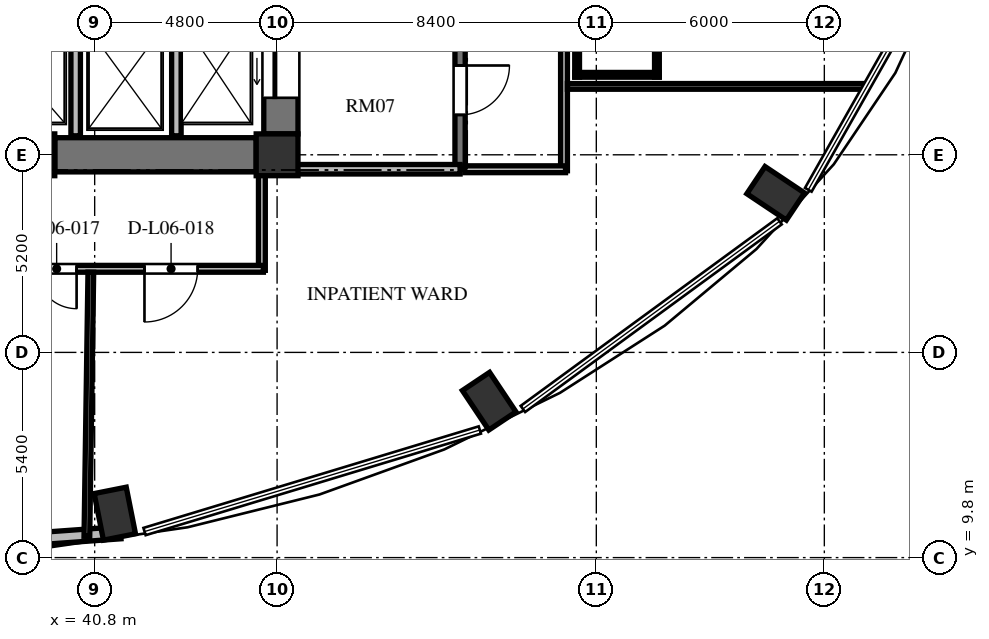
"""IFC4 building model, lengths in metres.
Left out: names, types, materials, properties, quantities, classifications, styles, units other than length and angle.
Written with IfcOpenShell. Run it as: python <this file> out.ifc"""

import sys

from ifc_helpers import new_model, si_unit, direction, frame, frame_2d, origin, origin_2d, place, context, subcontext, project, spatial, rectangle, extrude, element, fill, save


model = new_model("IFC4")
c1 = context("Model", 3, precision=1e-05, world=origin(), true_north=direction((0.0, 1.0)))
c2 = subcontext(c1, "Body", "Model", "MODEL_VIEW")
j1 = project(units=[si_unit("LENGTHUNIT", "METRE"), si_unit("PLANEANGLEUNIT", "RADIAN")], contexts=[c1])
p1 = place(None, origin())
s1 = spatial("IfcSite", under=j1, at=p1, CompositionType="ELEMENT")
p2 = place(p1, origin())
s2 = spatial("IfcBuilding", under=s1, at=p2, CompositionType="ELEMENT")
p3 = place(p2, frame((0.0, 0.0, 28.848)))
s3 = spatial("IfcBuildingStorey", under=s2, at=p3, CompositionType="ELEMENT", Elevation=28.848)
for number, where, z_axis, x_axis in (
    (1, (41.331, 10.956, 0.0), (0.0, 0.0, 1.0), (0.195, -0.981, 0.0)),
    (2, (51.181, 13.916, 0.0), (0.0, 0.0, 1.0), (0.556, -0.831, 0.0)),
    (3, (58.72, 19.386, 0.0), (0.0, 0.0, 1.0), (0.831, -0.556, 0.0)),
):
    element("IfcColumn", number, at=place(p3, frame(where, z_axis=z_axis, x_axis=x_axis)), inside=s3, PredefinedType="COLUMN", context=c2, shape_type="SweptSolid", body=[
        extrude(rectangle(XDim=1.25, YDim=0.86, at=origin_2d()), origin(), (0.0, 0.0, 1.0), 3.648),
    ])
for number, where, z_axis, x_axis in (
    (4, (39.2, 20.4, 0.0), (0.0, 0.0, 1.0), (1.0, 0.0, 0.0)),
    (5, (45.6, 20.4, 0.0), (0.0, 0.0, 1.0), (1.0, 0.0, 0.0)),
):
    element("IfcColumn", number, at=place(p3, frame(where, z_axis=z_axis, x_axis=x_axis)), inside=s3, PredefinedType="COLUMN", context=c2, shape_type="SweptSolid", body=[
        extrude(rectangle(XDim=1.1, YDim=1.1, at=origin_2d()), origin(), (0.0, 0.0, 1.0), 3.648),
    ])
p4 = place(p3, frame((45.7, 20.95, 0.0), z_axis=(0.0, 0.0, 1.0), x_axis=(0.0, 1.0, 0.0)))
e6 = element("IfcWall", 6, at=p4, inside=s3, PredefinedType="SHEAR", context=c2, shape_type="SweptSolid", body=[
    extrude(rectangle(XDim=14.1, YDim=0.9, at=frame_2d((7.05, 0.0))), origin(), (0.0, 0.0, 1.0), 3.648),
])
p5 = place(p4, frame((11.75, 0.0, 0.0)))
e7 = element("IfcOpeningElement", 7, at=p5, cuts=e6, PredefinedType="OPENING", context=c2, shape_type="SweptSolid", body=[
    extrude(rectangle(XDim=1.4, YDim=2.3, at=frame_2d((0.7, 1.15))), frame((0.0, 0.46, 0.0), z_axis=(0.0, -1.0, 0.0), x_axis=(1.0, 0.0, 0.0)), (0.0, 0.0, 1.0), 0.92),
])
p6 = place(p4, frame((0.95, 0.0, 0.0)))
e8 = element("IfcOpeningElement", 8, at=p6, cuts=e6, PredefinedType="OPENING", context=c2, shape_type="SweptSolid", body=[
    extrude(rectangle(XDim=1.4, YDim=2.3, at=frame_2d((0.7, 1.15))), frame((0.0, 0.46, 0.0), z_axis=(0.0, -1.0, 0.0), x_axis=(1.0, 0.0, 0.0)), (0.0, 0.0, 1.0), 0.92),
])
p7 = place(p3, frame((39.75, 20.4, 0.0), z_axis=(0.0, 0.0, 1.0), x_axis=(1.0, 0.0, 0.0)))
e9 = element("IfcWall", 9, at=p7, inside=s3, PredefinedType="SHEAR", context=c2, shape_type="SweptSolid", body=[
    extrude(rectangle(XDim=5.3, YDim=0.9, at=frame_2d((2.65, 0.0))), origin(), (0.0, 0.0, 1.0), 3.648),
])
p8 = place(p3, frame((35.821, 10.047, 0.0), z_axis=(0.0, 0.0, 1.0), x_axis=(0.997422321809, 0.071754525696, 0.0)))
e10 = element("IfcWall", 10, at=p8, inside=s3, PredefinedType="SOLIDWALL", context=c2, shape_type="SweptSolid", body=[
    extrude(rectangle(XDim=5.675, YDim=0.32, at=frame_2d((2.838, 0.0))), origin(), (0.0, 0.0, 1.0), 3.428),
])
p9 = place(p8, frame((2.238, 0.0, 0.85)))
e11 = element("IfcOpeningElement", 11, at=p9, cuts=e10, PredefinedType="OPENING", context=c2, shape_type="SweptSolid", body=[
    extrude(rectangle(XDim=1.2, YDim=1.8, at=frame_2d((0.6, 0.9))), frame((0.0, 0.17, 0.0), z_axis=(0.0, -1.0, 0.0), x_axis=(1.0, 0.0, 0.0)), (0.0, 0.0, 1.0), 0.34),
])
p10 = place(p3, frame((42.95, 20.9, 0.0), z_axis=(0.0, 0.0, 1.0), x_axis=(0.0, 1.0, 0.0)))
e12 = element("IfcWall", 12, at=p10, inside=s3, PredefinedType="SOLIDWALL", context=c2, shape_type="SweptSolid", body=[
    extrude(rectangle(XDim=3.2, YDim=0.25, at=frame_2d((1.6, 0.0))), origin(), (0.0, 0.0, 1.0), 3.428),
])
p11 = place(p3, frame((40.3, 20.9, 0.0), z_axis=(0.0, 0.0, 1.0), x_axis=(0.0, 1.0, 0.0)))
e13 = element("IfcWall", 13, at=p11, inside=s3, PredefinedType="SOLIDWALL", context=c2, shape_type="SweptSolid", body=[
    extrude(rectangle(XDim=2.8, YDim=0.25, at=frame_2d((1.4, 0.0))), origin(), (0.0, 0.0, 1.0), 3.428),
])
p12 = place(p3, frame((50.415, 35.845, 0.0), z_axis=(0.0, 0.0, 1.0), x_axis=(0.0, -1.0, 0.0)))
e14 = element("IfcWall", 14, at=p12, inside=s3, PredefinedType="SHEAR", context=c2, shape_type="SweptSolid", body=[
    extrude(rectangle(XDim=15.825, YDim=0.27, at=frame_2d((7.913, 0.0))), origin(), (0.0, 0.0, 1.0), 3.648),
])
p13 = place(p12, frame((4.445, 0.0, 0.0)))
e15 = element("IfcOpeningElement", 15, at=p13, cuts=e14, PredefinedType="OPENING", context=c2, shape_type="SweptSolid", body=[
    extrude(rectangle(XDim=1.2, YDim=2.15, at=frame_2d((0.6, 1.075))), frame((0.0, 0.145, 0.0), z_axis=(0.0, -1.0, 0.0), x_axis=(1.0, 0.0, 0.0)), (0.0, 0.0, 1.0), 0.29),
])
p14 = place(p12, frame((1.295, 0.0, 0.0)))
e16 = element("IfcOpeningElement", 16, at=p14, cuts=e14, PredefinedType="OPENING", context=c2, shape_type="SweptSolid", body=[
    extrude(rectangle(XDim=1.3, YDim=2.2, at=frame_2d((0.65, 1.1))), frame((0.0, 0.145, 0.0), z_axis=(0.0, -1.0, 0.0), x_axis=(1.0, 0.0, 0.0)), (0.0, 0.0, 1.0), 0.29),
])
p15 = place(p12, frame((13.095, 0.0, 0.0)))
e17 = element("IfcOpeningElement", 17, at=p15, cuts=e14, PredefinedType="OPENING", context=c2, shape_type="SweptSolid", body=[
    extrude(rectangle(XDim=1.3, YDim=2.2, at=frame_2d((0.65, 1.1))), frame((0.0, 0.145, 0.0), z_axis=(0.0, -1.0, 0.0), x_axis=(1.0, 0.0, 0.0)), (0.0, 0.0, 1.0), 0.29),
])
p16 = place(p3, frame((45.7, 20.02, 0.0), z_axis=(0.0, 0.0, 1.0), x_axis=(1.0, 0.0, 0.0)))
e18 = element("IfcWall", 18, at=p16, inside=s3, PredefinedType="SOLIDWALL", context=c2, shape_type="SweptSolid", body=[
    extrude(rectangle(XDim=4.715, YDim=0.25, at=frame_2d((2.357, 0.0))), origin(), (0.0, 0.0, 1.0), 2.813),
])
p17 = place(p3, frame((53.15, 26.64, 0.0), z_axis=(0.0, 0.0, 1.0), x_axis=(0.0, -1.0, 0.0)))
e19 = element("IfcWall", 19, at=p17, inside=s3, PredefinedType="PARTITIONING", context=c2, shape_type="SweptSolid", body=[
    extrude(rectangle(XDim=6.66, YDim=0.18, at=frame_2d((3.33, 0.0))), origin(), (0.0, 0.0, 1.0), 3.428),
])
p18 = place(p3, frame((53.19, 20.02, 0.0), z_axis=(0.0, 0.0, 1.0), x_axis=(-1.0, 0.0, 0.0)))
e20 = element("IfcWall", 20, at=p18, inside=s3, PredefinedType="PARTITIONING", context=c2, shape_type="SweptSolid", body=[
    extrude(rectangle(XDim=2.65, YDim=0.18, at=frame_2d((1.325, 0.0))), origin(), (0.0, 0.0, 1.0), 2.813),
])
p19 = place(p3, frame((45.2, 19.91, 0.0), z_axis=(0.0, 0.0, 1.0), x_axis=(0.0, -1.0, 0.0)))
e21 = element("IfcWall", 21, at=p19, inside=s3, PredefinedType="PARTITIONING", context=c2, shape_type="SweptSolid", body=[
    extrude(rectangle(XDim=2.55, YDim=0.18, at=frame_2d((1.275, 0.0))), origin(), (0.0, 0.0, 1.0), 3.428),
])
p20 = place(p3, frame((45.24, 17.4, 0.0), z_axis=(0.0, 0.0, 1.0), x_axis=(-1.0, 0.0, 0.0)))
e22 = element("IfcWall", 22, at=p20, inside=s3, PredefinedType="PARTITIONING", context=c2, shape_type="SweptSolid", body=[
    extrude(rectangle(XDim=21.93, YDim=0.18, at=frame_2d((10.965, 0.0))), origin(), (0.0, 0.0, 1.0), 3.053),
])
p21 = place(p20, frame((18.076, 0.0, 0.0)))
e23 = element("IfcOpeningElement", 23, at=p21, cuts=e22, PredefinedType="OPENING", context=c2, shape_type="SweptSolid", body=[
    extrude(rectangle(XDim=1.4, YDim=2.2, at=frame_2d((0.7, 1.1))), frame((0.0, 0.1, 0.0), z_axis=(0.0, -1.0, 0.0), x_axis=(1.0, 0.0, 0.0)), (0.0, 0.0, 1.0), 0.2),
])
p22 = place(p20, frame((13.34, 0.0, 0.0)))
e24 = element("IfcOpeningElement", 24, at=p22, cuts=e22, PredefinedType="OPENING", context=c2, shape_type="SweptSolid", body=[
    extrude(rectangle(XDim=1.4, YDim=2.2, at=frame_2d((0.7, 1.1))), frame((0.0, 0.1, 0.0), z_axis=(0.0, -1.0, 0.0), x_axis=(1.0, 0.0, 0.0)), (0.0, 0.0, 1.0), 0.2),
])
p23 = place(p20, frame((9.715, 0.0, 0.0)))
e25 = element("IfcOpeningElement", 25, at=p23, cuts=e22, PredefinedType="OPENING", context=c2, shape_type="SweptSolid", body=[
    extrude(rectangle(XDim=1.05, YDim=2.15, at=frame_2d((0.525, 1.075))), frame((0.0, 0.1, 0.0), z_axis=(0.0, -1.0, 0.0), x_axis=(1.0, 0.0, 0.0)), (0.0, 0.0, 1.0), 0.2),
])
p24 = place(p20, frame((4.916, 0.0, 0.0)))
e26 = element("IfcOpeningElement", 26, at=p24, cuts=e22, PredefinedType="OPENING", context=c2, shape_type="SweptSolid", body=[
    extrude(rectangle(XDim=1.05, YDim=2.15, at=frame_2d((0.525, 1.075))), frame((0.0, 0.1, 0.0), z_axis=(0.0, -1.0, 0.0), x_axis=(1.0, 0.0, 0.0)), (0.0, 0.0, 1.0), 0.2),
])
p25 = place(p20, frame((1.729, 0.0, 0.0)))
e27 = element("IfcOpeningElement", 27, at=p25, cuts=e22, PredefinedType="OPENING", context=c2, shape_type="SweptSolid", body=[
    extrude(rectangle(XDim=1.4, YDim=2.2, at=frame_2d((0.7, 1.1))), frame((0.0, 0.1, 0.0), z_axis=(0.0, -1.0, 0.0), x_axis=(1.0, 0.0, 0.0)), (0.0, 0.0, 1.0), 0.2),
])
p26 = place(p3, frame((53.24, 22.2, 0.0), z_axis=(0.0, 0.0, 1.0), x_axis=(1.0, 0.0, 0.0)))
e28 = element("IfcWall", 28, at=p26, inside=s3, PredefinedType="PARTITIONING", context=c2, shape_type="SweptSolid", body=[
    extrude(rectangle(XDim=7.875, YDim=0.15, at=frame_2d((3.938, 0.0))), origin(), (0.0, 0.0, 1.0), 3.428),
])
p27 = place(p3, frame((40.595, 10.359, 0.0), z_axis=(0.0, 0.0, 1.0), x_axis=(0.014960393547, 0.99988808705, 0.0)))
e29 = element("IfcWall", 29, at=p27, inside=s3, PredefinedType="PARTITIONING", context=c2, shape_type="SweptSolid", body=[
    extrude(rectangle(XDim=6.952, YDim=0.15, at=frame_2d((3.476, 0.0))), origin(), (0.0, 0.0, 1.0), 2.813),
])
p28 = place(p3, frame((53.435, 22.505, 0.0), z_axis=(0.0, 0.0, 1.0), x_axis=(1.0, 0.0, 0.0)))
e30 = element("IfcWall", 30, at=p28, inside=s3, PredefinedType="PARTITIONING", context=c2, shape_type="SweptSolid", body=[
    extrude(rectangle(XDim=2.22, YDim=0.125, at=frame_2d((1.11, 0.0))), origin(), (0.0, 0.0, 1.0), 3.428),
])
for number, where, z_axis, x_axis in (
    (31, (55.595, 22.445, 0.0), (0.0, 0.0, 1.0), (0.0, 1.0, 0.0)),
    (32, (53.495, 22.445, 0.0), (0.0, 0.0, 1.0), (0.0, 1.0, 0.0)),
):
    element("IfcWall", number, at=place(p3, frame(where, z_axis=z_axis, x_axis=x_axis)), inside=s3, PredefinedType="PARTITIONING", context=c2, shape_type="SweptSolid", body=[
        extrude(rectangle(XDim=2.28, YDim=0.125, at=frame_2d((1.14, 0.0))), origin(), (0.0, 0.0, 1.0), 3.428),
    ])
p29 = place(p6, origin())
e33 = element("IfcDoor", 33, at=p29, inside=s3, OperationType="SLIDING_TO_LEFT", PredefinedType="DOOR", context=c2, shape_type="SweptSolid", body=[
    extrude(rectangle(XDim=1.4, YDim=2.3, at=frame_2d((0.7, 1.15))), frame((0.0, 0.025, 0.0), z_axis=(0.0, -1.0, 0.0), x_axis=(1.0, 0.0, 0.0)), (0.0, 0.0, 1.0), 0.05),
])
fill(e8, e33)
p30 = place(p15, origin())
e34 = element("IfcDoor", 34, at=p30, inside=s3, OperationType="SINGLE_SWING_LEFT", PredefinedType="DOOR", context=c2, shape_type="SweptSolid", body=[
    extrude(rectangle(XDim=1.3, YDim=2.2, at=frame_2d((0.65, 1.1))), frame((0.0, 0.025, 0.0), z_axis=(0.0, -1.0, 0.0), x_axis=(1.0, 0.0, 0.0)), (0.0, 0.0, 1.0), 0.05),
])
fill(e17, e34)
p31 = place(p24, origin())
e35 = element("IfcDoor", 35, at=p31, inside=s3, OperationType="SINGLE_SWING_LEFT", PredefinedType="DOOR", context=c2, shape_type="SweptSolid", body=[
    extrude(rectangle(XDim=1.05, YDim=2.15, at=frame_2d((0.525, 1.075))), frame((0.0, 0.025, 0.0), z_axis=(0.0, -1.0, 0.0), x_axis=(1.0, 0.0, 0.0)), (0.0, 0.0, 1.0), 0.05),
])
fill(e26, e35)
p32 = place(p25, origin())
e36 = element("IfcDoor", 36, at=p32, inside=s3, OperationType="SINGLE_SWING_RIGHT", PredefinedType="DOOR", context=c2, shape_type="SweptSolid", body=[
    extrude(rectangle(XDim=1.4, YDim=2.2, at=frame_2d((0.7, 1.1))), frame((0.0, 0.025, 0.0), z_axis=(0.0, -1.0, 0.0), x_axis=(1.0, 0.0, 0.0)), (0.0, 0.0, 1.0), 0.05),
])
fill(e27, e36)
save(model, sys.argv[1])
